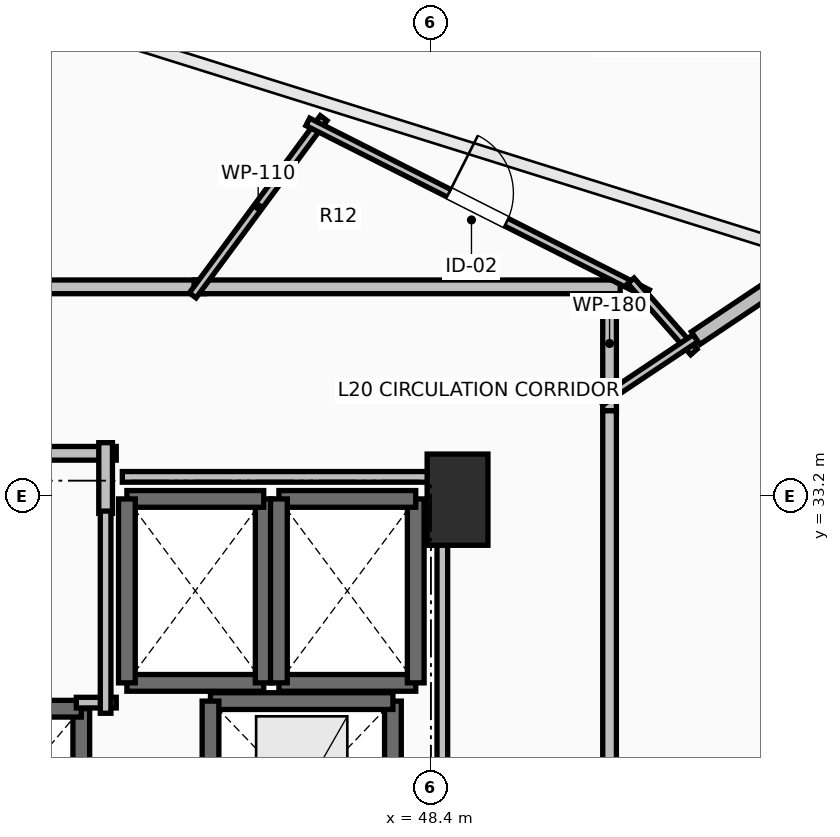
"""IFC4 building model, lengths in metres.
Left out: names, types, materials, properties, quantities, classifications, styles, units other than length and angle.
Written with IfcOpenShell. Run it as: python <this file> out.ifc"""

import sys

from ifc_helpers import new_model, si_unit, direction, frame, frame_2d, origin, origin_2d, place, context, subcontext, project, spatial, rectangle, extrude, element, fill, save


model = new_model("IFC4")
c1 = context("Model", 3, precision=1e-05, world=origin(), true_north=direction((0.0, 1.0)))
c2 = subcontext(c1, "Body", "Model", "MODEL_VIEW")
j1 = project(units=[si_unit("LENGTHUNIT", "METRE"), si_unit("PLANEANGLEUNIT", "RADIAN")], contexts=[c1])
p1 = place(None, origin())
s1 = spatial("IfcSite", under=j1, at=p1, CompositionType="ELEMENT")
p2 = place(p1, origin())
s2 = spatial("IfcBuilding", under=s1, at=p2, CompositionType="ELEMENT")
p3 = place(p2, frame((0.0, 0.0, 78.8)))
s3 = spatial("IfcBuildingStorey", under=s2, at=p3, CompositionType="ELEMENT", Elevation=78.8)
p4 = place(p3, frame((48.75, 33.15, 0.0), z_axis=(0.0, 0.0, 1.0), x_axis=(1.0, 0.0, 0.0)))
e1 = element("IfcColumn", 1, at=p4, inside=s3, PredefinedType="PILASTER", context=c2, shape_type="SweptSolid", body=[
    extrude(rectangle(XDim=0.8, YDim=1.2, at=origin_2d()), origin(), (0.0, 0.0, 1.0), 3.5),
])
p5 = place(p3, frame((43.8, 27.8, 0.0), z_axis=(0.0, 0.0, 1.0), x_axis=(0.0, 1.0, 0.0)))
e2 = element("IfcWall", 2, at=p5, inside=s3, PredefinedType="SOLIDWALL", context=c2, shape_type="SweptSolid", body=[
    extrude(rectangle(XDim=2.6, YDim=0.22, at=frame_2d((1.3, 0.0))), origin(), (0.0, 0.0, 1.0), 3.24),
])
p6 = place(p3, frame((43.8, 30.4, 0.0), z_axis=(0.0, 0.0, 1.0), x_axis=(-1.0, 0.0, 0.0)))
e3 = element("IfcWall", 3, at=p6, inside=s3, PredefinedType="SOLIDWALL", context=c2, shape_type="SweptSolid", body=[
    extrude(rectangle(XDim=2.2, YDim=0.22, at=frame_2d((1.1, 0.0))), origin(), (0.0, 0.0, 1.0), 3.24),
])
p7 = place(p3, frame((44.4, 30.74, 0.0), z_axis=(0.0, 0.0, 1.0), x_axis=(1.0, 0.0, 0.0)))
e4 = element("IfcWall", 4, at=p7, inside=s3, PredefinedType="SOLIDWALL", context=c2, shape_type="SweptSolid", body=[
    extrude(rectangle(XDim=1.8, YDim=0.22, at=frame_2d((0.9, 0.0))), origin(), (0.0, 0.0, 1.0), 3.24),
])
p8 = place(p3, frame((46.2, 30.74, 0.0), z_axis=(0.0, 0.0, 1.0), x_axis=(0.0, 1.0, 0.0)))
e5 = element("IfcWall", 5, at=p8, inside=s3, PredefinedType="SOLIDWALL", context=c2, shape_type="SweptSolid", body=[
    extrude(rectangle(XDim=2.42, YDim=0.22, at=frame_2d((1.21, 0.0))), origin(), (0.0, 0.0, 1.0), 3.24),
])
p9 = place(p3, frame((46.2, 33.16, 0.0), z_axis=(0.0, 0.0, 1.0), x_axis=(-1.0, 0.0, 0.0)))
e6 = element("IfcWall", 6, at=p9, inside=s3, PredefinedType="SOLIDWALL", context=c2, shape_type="SweptSolid", body=[
    extrude(rectangle(XDim=1.8, YDim=0.22, at=frame_2d((0.9, 0.0))), origin(), (0.0, 0.0, 1.0), 3.24),
])
p10 = place(p3, frame((44.4, 33.16, 0.0), z_axis=(0.0, 0.0, 1.0), x_axis=(0.0, -1.0, 0.0)))
e7 = element("IfcWall", 7, at=p10, inside=s3, PredefinedType="SOLIDWALL", context=c2, shape_type="SweptSolid", body=[
    extrude(rectangle(XDim=2.42, YDim=0.22, at=frame_2d((1.21, 0.0))), origin(), (0.0, 0.0, 1.0), 3.24),
])
p11 = place(p3, frame((46.4, 30.74, 0.0), z_axis=(0.0, 0.0, 1.0), x_axis=(1.0, 0.0, 0.0)))
e8 = element("IfcWall", 8, at=p11, inside=s3, PredefinedType="SOLIDWALL", context=c2, shape_type="SweptSolid", body=[
    extrude(rectangle(XDim=1.8, YDim=0.22, at=frame_2d((0.9, 0.0))), origin(), (0.0, 0.0, 1.0), 3.24),
])
p12 = place(p3, frame((48.2, 30.74, 0.0), z_axis=(0.0, 0.0, 1.0), x_axis=(0.0, 1.0, 0.0)))
e9 = element("IfcWall", 9, at=p12, inside=s3, PredefinedType="SOLIDWALL", context=c2, shape_type="SweptSolid", body=[
    extrude(rectangle(XDim=2.42, YDim=0.22, at=frame_2d((1.21, 0.0))), origin(), (0.0, 0.0, 1.0), 3.24),
])
p13 = place(p3, frame((48.2, 33.16, 0.0), z_axis=(0.0, 0.0, 1.0), x_axis=(-1.0, 0.0, 0.0)))
e10 = element("IfcWall", 10, at=p13, inside=s3, PredefinedType="SOLIDWALL", context=c2, shape_type="SweptSolid", body=[
    extrude(rectangle(XDim=1.8, YDim=0.22, at=frame_2d((0.9, 0.0))), origin(), (0.0, 0.0, 1.0), 3.24),
])
p14 = place(p3, frame((46.4, 33.16, 0.0), z_axis=(0.0, 0.0, 1.0), x_axis=(0.0, -1.0, 0.0)))
e11 = element("IfcWall", 11, at=p14, inside=s3, PredefinedType="SOLIDWALL", context=c2, shape_type="SweptSolid", body=[
    extrude(rectangle(XDim=2.42, YDim=0.22, at=frame_2d((1.21, 0.0))), origin(), (0.0, 0.0, 1.0), 3.24),
])
p15 = place(p3, frame((47.9, 28.0, 0.0), z_axis=(0.0, 0.0, 1.0), x_axis=(0.0, 1.0, 0.0)))
e12 = element("IfcWall", 12, at=p15, inside=s3, PredefinedType="SHEAR", context=c2, shape_type="SweptSolid", body=[
    extrude(rectangle(XDim=2.5, YDim=0.22, at=frame_2d((1.25, 0.0))), origin(), (0.0, 0.0, 1.0), 3.24),
])
p16 = place(p3, frame((47.9, 30.5, 0.0), z_axis=(0.0, 0.0, 1.0), x_axis=(-1.0, 0.0, 0.0)))
e13 = element("IfcWall", 13, at=p16, inside=s3, PredefinedType="SHEAR", context=c2, shape_type="SweptSolid", body=[
    extrude(rectangle(XDim=2.4, YDim=0.22, at=frame_2d((1.2, 0.0))), origin(), (0.0, 0.0, 1.0), 3.24),
])
p17 = place(p3, frame((45.5, 30.5, 0.0), z_axis=(0.0, 0.0, 1.0), x_axis=(0.0, -1.0, 0.0)))
e14 = element("IfcWall", 14, at=p17, inside=s3, PredefinedType="SHEAR", context=c2, shape_type="SweptSolid", body=[
    extrude(rectangle(XDim=2.5, YDim=0.22, at=frame_2d((1.25, 0.0))), origin(), (0.0, 0.0, 1.0), 3.24),
])
p18 = place(p3, frame((44.26, 33.76, 0.0), z_axis=(0.0, 0.0, 1.0), x_axis=(-1.0, 0.0, 0.0)))
e15 = element("IfcWall", 15, at=p18, inside=s3, PredefinedType="PARTITIONING", context=c2, shape_type="SweptSolid", body=[
    extrude(rectangle(XDim=4.61, YDim=0.18, at=frame_2d((2.305, 0.0))), origin(), (0.0, 0.0, 1.0), 3.24),
])
p19 = place(p18, frame((1.88, 0.0, 0.0)))
e16 = element("IfcOpeningElement", 16, at=p19, cuts=e15, PredefinedType="OPENING", context=c2, shape_type="SweptSolid", body=[
    extrude(rectangle(XDim=0.85, YDim=2.1, at=frame_2d((0.425, 1.05))), frame((0.0, 0.105, 0.0), z_axis=(0.0, -1.0, 0.0), x_axis=(1.0, 0.0, 0.0)), (0.0, 0.0, 1.0), 0.21),
])
p20 = place(p3, frame((44.12, 32.97, 0.0), z_axis=(0.0, 0.0, 1.0), x_axis=(0.0, 1.0, 0.0)))
e17 = element("IfcWall", 17, at=p20, inside=s3, PredefinedType="PARTITIONING", context=c2, shape_type="SweptSolid", body=[
    extrude(rectangle(XDim=0.93, YDim=0.18, at=frame_2d((0.465, 0.0))), origin(), (0.0, 0.0, 1.0), 3.24),
])
p21 = place(p3, frame((45.424, 35.95, 0.0), z_axis=(0.0, 0.0, 1.0), x_axis=(-1.0, 0.0, 0.0)))
e18 = element("IfcWall", 18, at=p21, inside=s3, PredefinedType="PARTITIONING", context=c2, shape_type="SweptSolid", body=[
    extrude(rectangle(XDim=5.505, YDim=0.18, at=frame_2d((2.752, 0.0))), origin(), (0.0, 0.0, 1.0), 2.922),
])
p22 = place(p21, frame((2.228, 0.0, 0.0)))
e19 = element("IfcOpeningElement", 19, at=p22, cuts=e18, PredefinedType="OPENING", context=c2, shape_type="SweptSolid", body=[
    extrude(rectangle(XDim=1.05, YDim=2.2, at=frame_2d((0.525, 1.1))), frame((0.0, 0.105, 0.0), z_axis=(0.0, -1.0, 0.0), x_axis=(1.0, 0.0, 0.0)), (0.0, 0.0, 1.0), 0.21),
])
p23 = place(p3, frame((50.75, 34.319, 0.0), z_axis=(0.0, 0.0, 1.0), x_axis=(0.0, 1.0, 0.0)))
e20 = element("IfcWall", 20, at=p23, inside=s3, PredefinedType="PARTITIONING", context=c2, shape_type="SweptSolid", body=[
    extrude(rectangle(XDim=1.771, YDim=0.18, at=frame_2d((0.885, 0.0))), origin(), (0.0, 0.0, 1.0), 2.432),
])
p24 = place(p3, frame((50.89, 35.95, 0.0), z_axis=(0.0, 0.0, 1.0), x_axis=(-1.0, 0.0, 0.0)))
e21 = element("IfcWall", 21, at=p24, inside=s3, PredefinedType="PARTITIONING", context=c2, shape_type="SweptSolid", body=[
    extrude(rectangle(XDim=5.606, YDim=0.18, at=frame_2d((2.803, 0.0))), origin(), (0.0, 0.0, 1.0), 2.432),
])
p25 = place(p3, frame((50.75, 20.779, 0.0), z_axis=(0.0, 0.0, 1.0), x_axis=(0.0, 1.0, 0.0)))
e22 = element("IfcWall", 22, at=p25, inside=s3, PredefinedType="PARTITIONING", context=c2, shape_type="SweptSolid", body=[
    extrude(rectangle(XDim=13.54, YDim=0.18, at=frame_2d((6.77, 0.0))), origin(), (0.0, 0.0, 1.0), 2.432),
])
p26 = place(p25, frame((6.27, 0.0, 0.0)))
e23 = element("IfcOpeningElement", 23, at=p26, cuts=e22, PredefinedType="OPENING", context=c2, shape_type="SweptSolid", body=[
    extrude(rectangle(XDim=1.0, YDim=2.15, at=frame_2d((0.5, 1.075))), frame((0.0, 0.105, 0.0), z_axis=(0.0, -1.0, 0.0), x_axis=(1.0, 0.0, 0.0)), (0.0, 0.0, 1.0), 0.21),
])
p27 = place(p3, frame((45.266, 35.837, 0.0), z_axis=(0.0, 0.0, 1.0), x_axis=(0.594069015324, 0.804414075605, 0.0)))
e24 = element("IfcWall", 24, at=p27, inside=s3, PredefinedType="PARTITIONING", context=c2, shape_type="SweptSolid", body=[
    extrude(rectangle(XDim=2.899, YDim=0.11, at=frame_2d((1.45, 0.0))), origin(), (0.0, 0.0, 1.0), 2.922),
])
p28 = place(p3, frame((46.78, 38.12, 0.0), z_axis=(0.0, 0.0, 1.0), x_axis=(0.892517538434, -0.451012686726, 0.0)))
e25 = element("IfcWall", 25, at=p28, inside=s3, PredefinedType="PARTITIONING", context=c2, shape_type="SweptSolid", body=[
    extrude(rectangle(XDim=5.007, YDim=0.11, at=frame_2d((2.503, 0.0))), origin(), (0.0, 0.0, 1.0), 2.432),
])
p29 = place(p28, frame((2.079, 0.0, 0.0)))
e26 = element("IfcOpeningElement", 26, at=p29, cuts=e25, PredefinedType="OPENING", context=c2, shape_type="SweptSolid", body=[
    extrude(rectangle(XDim=0.85, YDim=2.1, at=frame_2d((0.425, 1.05))), frame((0.0, 0.07, 0.0), z_axis=(0.0, -1.0, 0.0), x_axis=(1.0, 0.0, 0.0)), (0.0, 0.0, 1.0), 0.14),
])
p30 = place(p3, frame((51.031, 36.03, 0.0), z_axis=(0.0, 0.0, 1.0), x_axis=(0.661996266618, -0.749507133377, 0.0)))
e27 = element("IfcWall", 27, at=p30, inside=s3, PredefinedType="PARTITIONING", context=c2, shape_type="SweptSolid", body=[
    extrude(rectangle(XDim=1.25, YDim=0.11, at=frame_2d((0.625, 0.0))), origin(), (0.0, 0.0, 1.0), 2.432),
])
p31 = place(p3, frame((51.882, 35.276, 0.0), z_axis=(0.0, 0.0, 1.0), x_axis=(-0.831374526136, -0.555712513169, 0.0)))
e28 = element("IfcWall", 28, at=p31, inside=s3, PredefinedType="PARTITIONING", context=c2, shape_type="SweptSolid", body=[
    extrude(rectangle(XDim=1.502, YDim=0.11, at=frame_2d((0.751, 0.0))), origin(), (0.0, 0.0, 1.0), 2.922),
])
p32 = place(p3, frame((51.883, 35.276, 0.0), z_axis=(0.0, 0.0, 1.0), x_axis=(0.831464132421, 0.555578434154, 0.0)))
e29 = element("IfcWall", 29, at=p32, inside=s3, PredefinedType="PARTITIONING", context=c2, shape_type="SweptSolid", body=[
    extrude(rectangle(XDim=6.862, YDim=0.2, at=frame_2d((3.431, 0.0))), origin(), (0.0, 0.0, 1.0), 2.677),
])
p33 = place(p3, frame((43.735, 30.48, 0.0), z_axis=(0.0, 0.0, 1.0), x_axis=(1.0, 0.0, 0.0)))
e30 = element("IfcWall", 30, at=p33, inside=s3, PredefinedType="PARTITIONING", context=c2, shape_type="SweptSolid", body=[
    extrude(rectangle(XDim=0.525, YDim=0.14, at=frame_2d((0.262, 0.0))), origin(), (0.0, 0.0, 1.0), 3.24),
])
p34 = place(p3, frame((44.12, 30.34, 0.0), z_axis=(0.0, 0.0, 1.0), x_axis=(0.0, 1.0, 0.0)))
e31 = element("IfcWall", 31, at=p34, inside=s3, PredefinedType="PARTITIONING", context=c2, shape_type="SweptSolid", body=[
    extrude(rectangle(XDim=2.66, YDim=0.14, at=frame_2d((1.33, 0.0))), origin(), (0.0, 0.0, 1.0), 3.24),
])
p35 = place(p3, frame((44.34, 33.45, 0.0), z_axis=(0.0, 0.0, 1.0), x_axis=(1.0, 0.0, 0.0)))
e32 = element("IfcWall", 32, at=p35, inside=s3, PredefinedType="PARTITIONING", context=c2, shape_type="SweptSolid", body=[
    extrude(rectangle(XDim=4.21, YDim=0.14, at=frame_2d((2.105, 0.0))), origin(), (0.0, 0.0, 1.0), 2.432),
])
p36 = place(p3, frame((48.55, 33.45, 0.0), z_axis=(0.0, 0.0, 1.0), x_axis=(0.0, -1.0, 0.0)))
e33 = element("IfcWall", 33, at=p36, inside=s3, PredefinedType="PARTITIONING", context=c2, shape_type="SweptSolid", body=[
    extrude(rectangle(XDim=5.254, YDim=0.14, at=frame_2d((2.627, 0.0))), origin(), (0.0, 0.0, 1.0), 2.432),
])
p37 = place(p29, origin())
e34 = element("IfcDoor", 34, at=p37, inside=s3, OperationType="SINGLE_SWING_LEFT", PredefinedType="DOOR", context=c2, shape_type="SweptSolid", body=[
    extrude(rectangle(XDim=0.85, YDim=2.1, at=frame_2d((0.425, 1.05))), frame((0.0, 0.025, 0.0), z_axis=(0.0, -1.0, 0.0), x_axis=(1.0, 0.0, 0.0)), (0.0, 0.0, 1.0), 0.05),
])
fill(e26, e34)
save(model, sys.argv[1])
